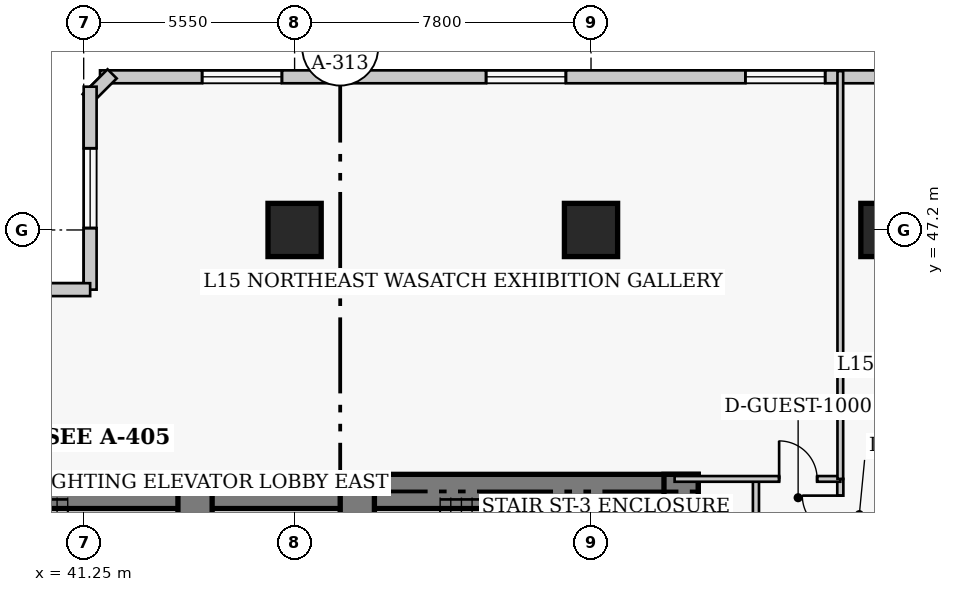
"""IFC4 building model, lengths in metres.
Left out: names, types, materials, properties, quantities, classifications, styles, units other than length and angle.
Written with IfcOpenShell. Run it as: python <this file> out.ifc"""

import sys

from ifc_helpers import new_model, si_unit, direction, frame, frame_2d, origin, origin_2d, place, context, subcontext, project, spatial, rectangle, extrude, element, fill, save


model = new_model("IFC4")
c1 = context("Model", 3, precision=1e-05, world=origin(), true_north=direction((0.0, 1.0)))
c2 = subcontext(c1, "Body", "Model", "MODEL_VIEW")
j1 = project(units=[si_unit("LENGTHUNIT", "METRE"), si_unit("PLANEANGLEUNIT", "RADIAN")], contexts=[c1])
p1 = place(None, origin())
s1 = spatial("IfcSite", under=j1, at=p1, CompositionType="ELEMENT")
p2 = place(p1, origin())
s2 = spatial("IfcBuilding", under=s1, at=p2, CompositionType="ELEMENT")
p3 = place(p2, frame((0.0, 0.0, 64.0)))
s3 = spatial("IfcBuildingStorey", under=s2, at=p3, CompositionType="ELEMENT", Elevation=64.0)
p4 = place(p3, frame((35.85, 40.32, 0.0), z_axis=(0.0, 0.0, 1.0), x_axis=(1.0, 0.0, 0.0)))
e1 = element("IfcWall", 1, at=p4, inside=s3, PredefinedType="SHEAR", context=c2, shape_type="SweptSolid", body=[
    extrude(rectangle(XDim=12.6, YDim=0.9, at=frame_2d((6.3, 0.0))), origin(), (0.0, 0.0, 1.0), 3.8),
])
p5 = place(p3, frame((48.45, 40.32, 0.0), z_axis=(0.0, 0.0, 1.0), x_axis=(1.0, 0.0, 0.0)))
e2 = element("IfcWall", 2, at=p5, inside=s3, PredefinedType="SHEAR", context=c2, shape_type="SweptSolid", body=[
    extrude(rectangle(XDim=8.97, YDim=0.9, at=frame_2d((4.485, 0.0))), origin(), (0.0, 0.0, 1.0), 3.8),
])
p6 = place(p3, frame((56.97, 27.05, 0.0), z_axis=(0.0, 0.0, 1.0), x_axis=(0.0, 1.0, 0.0)))
e3 = element("IfcWall", 3, at=p6, inside=s3, PredefinedType="SHEAR", context=c2, shape_type="SweptSolid", body=[
    extrude(rectangle(XDim=13.72, YDim=0.9, at=frame_2d((6.86, 0.0))), origin(), (0.0, 0.0, 1.0), 3.8),
])
p7 = place(p3, frame((44.18, 36.37, 0.0), z_axis=(0.0, 0.0, 1.0), x_axis=(0.0, 1.0, 0.0)))
e4 = element("IfcWall", 4, at=p7, inside=s3, PredefinedType="SHEAR", context=c2, shape_type="SweptSolid", body=[
    extrude(rectangle(XDim=3.95, YDim=0.9, at=frame_2d((1.975, 0.0))), origin(), (0.0, 0.0, 1.0), 3.8),
])
p8 = place(p3, frame((48.45, 32.3, 0.0), z_axis=(0.0, 0.0, 1.0), x_axis=(0.0, 1.0, 0.0)))
e5 = element("IfcWall", 5, at=p8, inside=s3, PredefinedType="SHEAR", context=c2, shape_type="SweptSolid", body=[
    extrude(rectangle(XDim=8.02, YDim=0.9, at=frame_2d((4.01, 0.0))), origin(), (0.0, 0.0, 1.0), 3.8),
])
p9 = place(p8, frame((5.9, 0.0, 0.0)))
e6 = element("IfcOpeningElement", 6, at=p9, cuts=e5, PredefinedType="OPENING", context=c2, shape_type="SweptSolid", body=[
    extrude(rectangle(XDim=1.1, YDim=2.15, at=frame_2d((0.55, 1.075))), frame((0.0, 0.46, 0.0), z_axis=(0.0, -1.0, 0.0), x_axis=(1.0, 0.0, 0.0)), (0.0, 0.0, 1.0), 0.92),
])
for number, where, z_axis, x_axis in (
    (7, (46.8, 47.2, 0.0), (0.0, 0.0, 1.0), (1.0, 0.0, 0.0)),
    (8, (54.6, 47.2, 0.0), (0.0, 0.0, 1.0), (1.0, 0.0, 0.0)),
    (9, (62.4, 47.2, 0.0), (0.0, 0.0, 1.0), (1.0, 0.0, 0.0)),
):
    element("IfcColumn", number, at=place(p3, frame(where, z_axis=z_axis, x_axis=x_axis)), inside=s3, PredefinedType="COLUMN", context=c2, shape_type="SweptSolid", body=[
        extrude(rectangle(XDim=1.4, YDim=1.4, at=origin_2d()), origin(), (0.0, 0.0, 1.0), 3.8),
    ])
p10 = place(p3, frame((71.57, 51.23, 0.0), z_axis=(0.0, 0.0, 1.0), x_axis=(-1.0, 0.0, 0.0)))
e10 = element("IfcWall", 10, at=p10, inside=s3, PredefinedType="SOLIDWALL", context=c2, shape_type="SweptSolid", body=[
    extrude(rectangle(XDim=29.89, YDim=0.34, at=frame_2d((14.945, 0.0))), origin(), (0.0, 0.0, 1.0), 3.54),
])
p11 = place(p10, frame((2.686, 0.0, 0.85)))
e11 = element("IfcOpeningElement", 11, at=p11, cuts=e10, PredefinedType="OPENING", context=c2, shape_type="SweptSolid", body=[
    extrude(rectangle(XDim=2.1, YDim=1.85, at=frame_2d((1.05, 0.925))), frame((0.0, 0.18, 0.0), z_axis=(0.0, -1.0, 0.0), x_axis=(1.0, 0.0, 0.0)), (0.0, 0.0, 1.0), 0.36),
])
p12 = place(p10, frame((10.809, 0.0, 0.85)))
e12 = element("IfcOpeningElement", 12, at=p12, cuts=e10, PredefinedType="OPENING", context=c2, shape_type="SweptSolid", body=[
    extrude(rectangle(XDim=2.1, YDim=1.85, at=frame_2d((1.05, 0.925))), frame((0.0, 0.18, 0.0), z_axis=(0.0, -1.0, 0.0), x_axis=(1.0, 0.0, 0.0)), (0.0, 0.0, 1.0), 0.36),
])
p13 = place(p10, frame((17.631, 0.0, 0.85)))
e13 = element("IfcOpeningElement", 13, at=p13, cuts=e10, PredefinedType="OPENING", context=c2, shape_type="SweptSolid", body=[
    extrude(rectangle(XDim=2.1, YDim=1.85, at=frame_2d((1.05, 0.925))), frame((0.0, 0.18, 0.0), z_axis=(0.0, -1.0, 0.0), x_axis=(1.0, 0.0, 0.0)), (0.0, 0.0, 1.0), 0.36),
])
p14 = place(p10, frame((25.104, 0.0, 0.85)))
e14 = element("IfcOpeningElement", 14, at=p14, cuts=e10, PredefinedType="OPENING", context=c2, shape_type="SweptSolid", body=[
    extrude(rectangle(XDim=2.1, YDim=1.85, at=frame_2d((1.05, 0.925))), frame((0.0, 0.18, 0.0), z_axis=(0.0, -1.0, 0.0), x_axis=(1.0, 0.0, 0.0)), (0.0, 0.0, 1.0), 0.36),
])
p15 = place(p3, frame((41.999, 51.308, 0.0), z_axis=(0.0, 0.0, 1.0), x_axis=(-0.707238225886, -0.706975312048, 0.0)))
e15 = element("IfcWall", 15, at=p15, inside=s3, PredefinedType="SOLIDWALL", context=c2, shape_type="SweptSolid", body=[
    extrude(rectangle(XDim=0.929, YDim=0.34, at=frame_2d((0.464, 0.0))), origin(), (0.0, 0.0, 1.0), 3.54),
])
p16 = place(p3, frame((41.42, 50.97, 0.0), z_axis=(0.0, 0.0, 1.0), x_axis=(0.0, -1.0, 0.0)))
e16 = element("IfcWall", 16, at=p16, inside=s3, PredefinedType="SOLIDWALL", context=c2, shape_type="SweptSolid", body=[
    extrude(rectangle(XDim=5.34, YDim=0.34, at=frame_2d((2.67, 0.0))), origin(), (0.0, 0.0, 1.0), 3.54),
])
p17 = place(p16, frame((1.62, 0.0, 0.85)))
e17 = element("IfcOpeningElement", 17, at=p17, cuts=e16, PredefinedType="OPENING", context=c2, shape_type="SweptSolid", body=[
    extrude(rectangle(XDim=2.1, YDim=1.85, at=frame_2d((1.05, 0.925))), frame((0.0, 0.18, 0.0), z_axis=(0.0, -1.0, 0.0), x_axis=(1.0, 0.0, 0.0)), (0.0, 0.0, 1.0), 0.36),
])
p18 = place(p3, frame((41.42, 45.63, 0.0), z_axis=(0.0, 0.0, 1.0), x_axis=(-1.0, 0.0, 0.0)))
e18 = element("IfcWall", 18, at=p18, inside=s3, PredefinedType="SOLIDWALL", context=c2, shape_type="SweptSolid", body=[
    extrude(rectangle(XDim=4.84, YDim=0.34, at=frame_2d((2.42, 0.0))), origin(), (0.0, 0.0, 1.0), 3.54),
])
p19 = place(p18, frame((1.37, 0.0, 0.85)))
e19 = element("IfcOpeningElement", 19, at=p19, cuts=e18, PredefinedType="OPENING", context=c2, shape_type="SweptSolid", body=[
    extrude(rectangle(XDim=2.1, YDim=1.85, at=frame_2d((1.05, 0.925))), frame((0.0, 0.18, 0.0), z_axis=(0.0, -1.0, 0.0), x_axis=(1.0, 0.0, 0.0)), (0.0, 0.0, 1.0), 0.36),
])
p20 = place(p3, frame((61.16, 10.25, 0.0), z_axis=(0.0, 0.0, 1.0), x_axis=(0.0, 1.0, 0.0)))
e20 = element("IfcWall", 20, at=p20, inside=s3, PredefinedType="PARTITIONING", context=c2, shape_type="SweptSolid", body=[
    extrude(rectangle(XDim=30.4, YDim=0.16, at=frame_2d((15.2, 0.0))), origin(), (0.0, 0.0, 1.0), 3.54),
])
p21 = place(p20, frame((4.4, 0.0, 0.0)))
e21 = element("IfcOpeningElement", 21, at=p21, cuts=e20, PredefinedType="OPENING", context=c2, shape_type="SweptSolid", body=[
    extrude(rectangle(XDim=0.95, YDim=2.1, at=frame_2d((0.475, 1.05))), frame((0.0, 0.09, 0.0), z_axis=(0.0, -1.0, 0.0), x_axis=(1.0, 0.0, 0.0)), (0.0, 0.0, 1.0), 0.18),
])
p22 = place(p20, frame((13.675, 0.0, 0.0)))
e22 = element("IfcOpeningElement", 22, at=p22, cuts=e20, PredefinedType="OPENING", context=c2, shape_type="SweptSolid", body=[
    extrude(rectangle(XDim=0.95, YDim=2.1, at=frame_2d((0.475, 1.05))), frame((0.0, 0.09, 0.0), z_axis=(0.0, -1.0, 0.0), x_axis=(1.0, 0.0, 0.0)), (0.0, 0.0, 1.0), 0.18),
])
p23 = place(p20, frame((21.8, 0.0, 0.0)))
e23 = element("IfcOpeningElement", 23, at=p23, cuts=e20, PredefinedType="OPENING", context=c2, shape_type="SweptSolid", body=[
    extrude(rectangle(XDim=0.95, YDim=2.1, at=frame_2d((0.475, 1.05))), frame((0.0, 0.09, 0.0), z_axis=(0.0, -1.0, 0.0), x_axis=(1.0, 0.0, 0.0)), (0.0, 0.0, 1.0), 0.18),
])
p24 = place(p20, frame((28.96, 0.0, 0.0)))
e24 = element("IfcOpeningElement", 24, at=p24, cuts=e20, PredefinedType="OPENING", context=c2, shape_type="SweptSolid", body=[
    extrude(rectangle(XDim=1.0, YDim=2.15, at=frame_2d((0.5, 1.075))), frame((0.0, 0.09, 0.0), z_axis=(0.0, -1.0, 0.0), x_axis=(1.0, 0.0, 0.0)), (0.0, 0.0, 1.0), 0.18),
])
p25 = place(p3, frame((58.94, 25.31, 0.0), z_axis=(0.0, 0.0, 1.0), x_axis=(0.0, 1.0, 0.0)))
e25 = element("IfcWall", 25, at=p25, inside=s3, PredefinedType="PARTITIONING", context=c2, shape_type="SweptSolid", body=[
    extrude(rectangle(XDim=15.34, YDim=0.16, at=frame_2d((7.67, 0.0))), origin(), (0.0, 0.0, 1.0), 3.54),
])
p26 = place(p3, frame((56.8, 40.65, 0.0), z_axis=(0.0, 0.0, 1.0), x_axis=(1.0, 0.0, 0.0)))
e26 = element("IfcWall", 26, at=p26, inside=s3, PredefinedType="PARTITIONING", context=c2, shape_type="SweptSolid", body=[
    extrude(rectangle(XDim=4.36, YDim=0.15, at=frame_2d((2.18, 0.0))), origin(), (0.0, 0.0, 1.0), 3.54),
])
p27 = place(p26, frame((2.75, 0.0, 0.0)))
e27 = element("IfcOpeningElement", 27, at=p27, cuts=e26, PredefinedType="OPENING", context=c2, shape_type="SweptSolid", body=[
    extrude(rectangle(XDim=1.0, YDim=2.15, at=frame_2d((0.5, 1.075))), frame((0.0, 0.085, 0.0), z_axis=(0.0, -1.0, 0.0), x_axis=(1.0, 0.0, 0.0)), (0.0, 0.0, 1.0), 0.17),
])
p28 = place(p3, frame((61.16, 40.65, 0.0), z_axis=(0.0, 0.0, 1.0), x_axis=(0.0, 1.0, 0.0)))
e28 = element("IfcWall", 28, at=p28, inside=s3, PredefinedType="PARTITIONING", context=c2, shape_type="SweptSolid", body=[
    extrude(rectangle(XDim=10.73, YDim=0.15, at=frame_2d((5.365, 0.0))), origin(), (0.0, 0.0, 1.0), 3.54),
])
p29 = place(p12, origin())
e29 = element("IfcWindow", 29, at=p29, inside=s3, PartitioningType="SINGLE_PANEL", PredefinedType="WINDOW", context=c2, shape_type="SweptSolid", body=[
    extrude(rectangle(XDim=2.1, YDim=1.85, at=frame_2d((1.05, 0.925))), frame((0.0, 0.03, 0.0), z_axis=(0.0, -1.0, 0.0), x_axis=(1.0, 0.0, 0.0)), (0.0, 0.0, 1.0), 0.06),
])
fill(e12, e29)
p30 = place(p13, origin())
e30 = element("IfcWindow", 30, at=p30, inside=s3, PartitioningType="SINGLE_PANEL", PredefinedType="WINDOW", context=c2, shape_type="SweptSolid", body=[
    extrude(rectangle(XDim=2.1, YDim=1.85, at=frame_2d((1.05, 0.925))), frame((0.0, 0.03, 0.0), z_axis=(0.0, -1.0, 0.0), x_axis=(1.0, 0.0, 0.0)), (0.0, 0.0, 1.0), 0.06),
])
fill(e13, e30)
p31 = place(p14, origin())
e31 = element("IfcWindow", 31, at=p31, inside=s3, PartitioningType="SINGLE_PANEL", PredefinedType="WINDOW", context=c2, shape_type="SweptSolid", body=[
    extrude(rectangle(XDim=2.1, YDim=1.85, at=frame_2d((1.05, 0.925))), frame((0.0, 0.03, 0.0), z_axis=(0.0, -1.0, 0.0), x_axis=(1.0, 0.0, 0.0)), (0.0, 0.0, 1.0), 0.06),
])
fill(e14, e31)
p32 = place(p17, origin())
e32 = element("IfcWindow", 32, at=p32, inside=s3, PartitioningType="SINGLE_PANEL", PredefinedType="WINDOW", context=c2, shape_type="SweptSolid", body=[
    extrude(rectangle(XDim=2.1, YDim=1.85, at=frame_2d((1.05, 0.925))), frame((0.0, 0.03, 0.0), z_axis=(0.0, -1.0, 0.0), x_axis=(1.0, 0.0, 0.0)), (0.0, 0.0, 1.0), 0.06),
])
fill(e17, e32)
p33 = place(p27, origin())
e33 = element("IfcDoor", 33, at=p33, inside=s3, OperationType="SINGLE_SWING_LEFT", PredefinedType="DOOR", context=c2, shape_type="SweptSolid", body=[
    extrude(rectangle(XDim=1.0, YDim=2.15, at=frame_2d((0.5, 1.075))), frame((0.0, 0.025, 0.0), z_axis=(0.0, -1.0, 0.0), x_axis=(1.0, 0.0, 0.0)), (0.0, 0.0, 1.0), 0.05),
])
fill(e27, e33)
p34 = place(p24, origin())
e34 = element("IfcDoor", 34, at=p34, inside=s3, OperationType="SINGLE_SWING_RIGHT", PredefinedType="DOOR", context=c2, shape_type="SweptSolid", body=[
    extrude(rectangle(XDim=1.0, YDim=2.15, at=frame_2d((0.5, 1.075))), frame((0.0, 0.025, 0.0), z_axis=(0.0, -1.0, 0.0), x_axis=(1.0, 0.0, 0.0)), (0.0, 0.0, 1.0), 0.05),
])
fill(e24, e34)
save(model, sys.argv[1])
